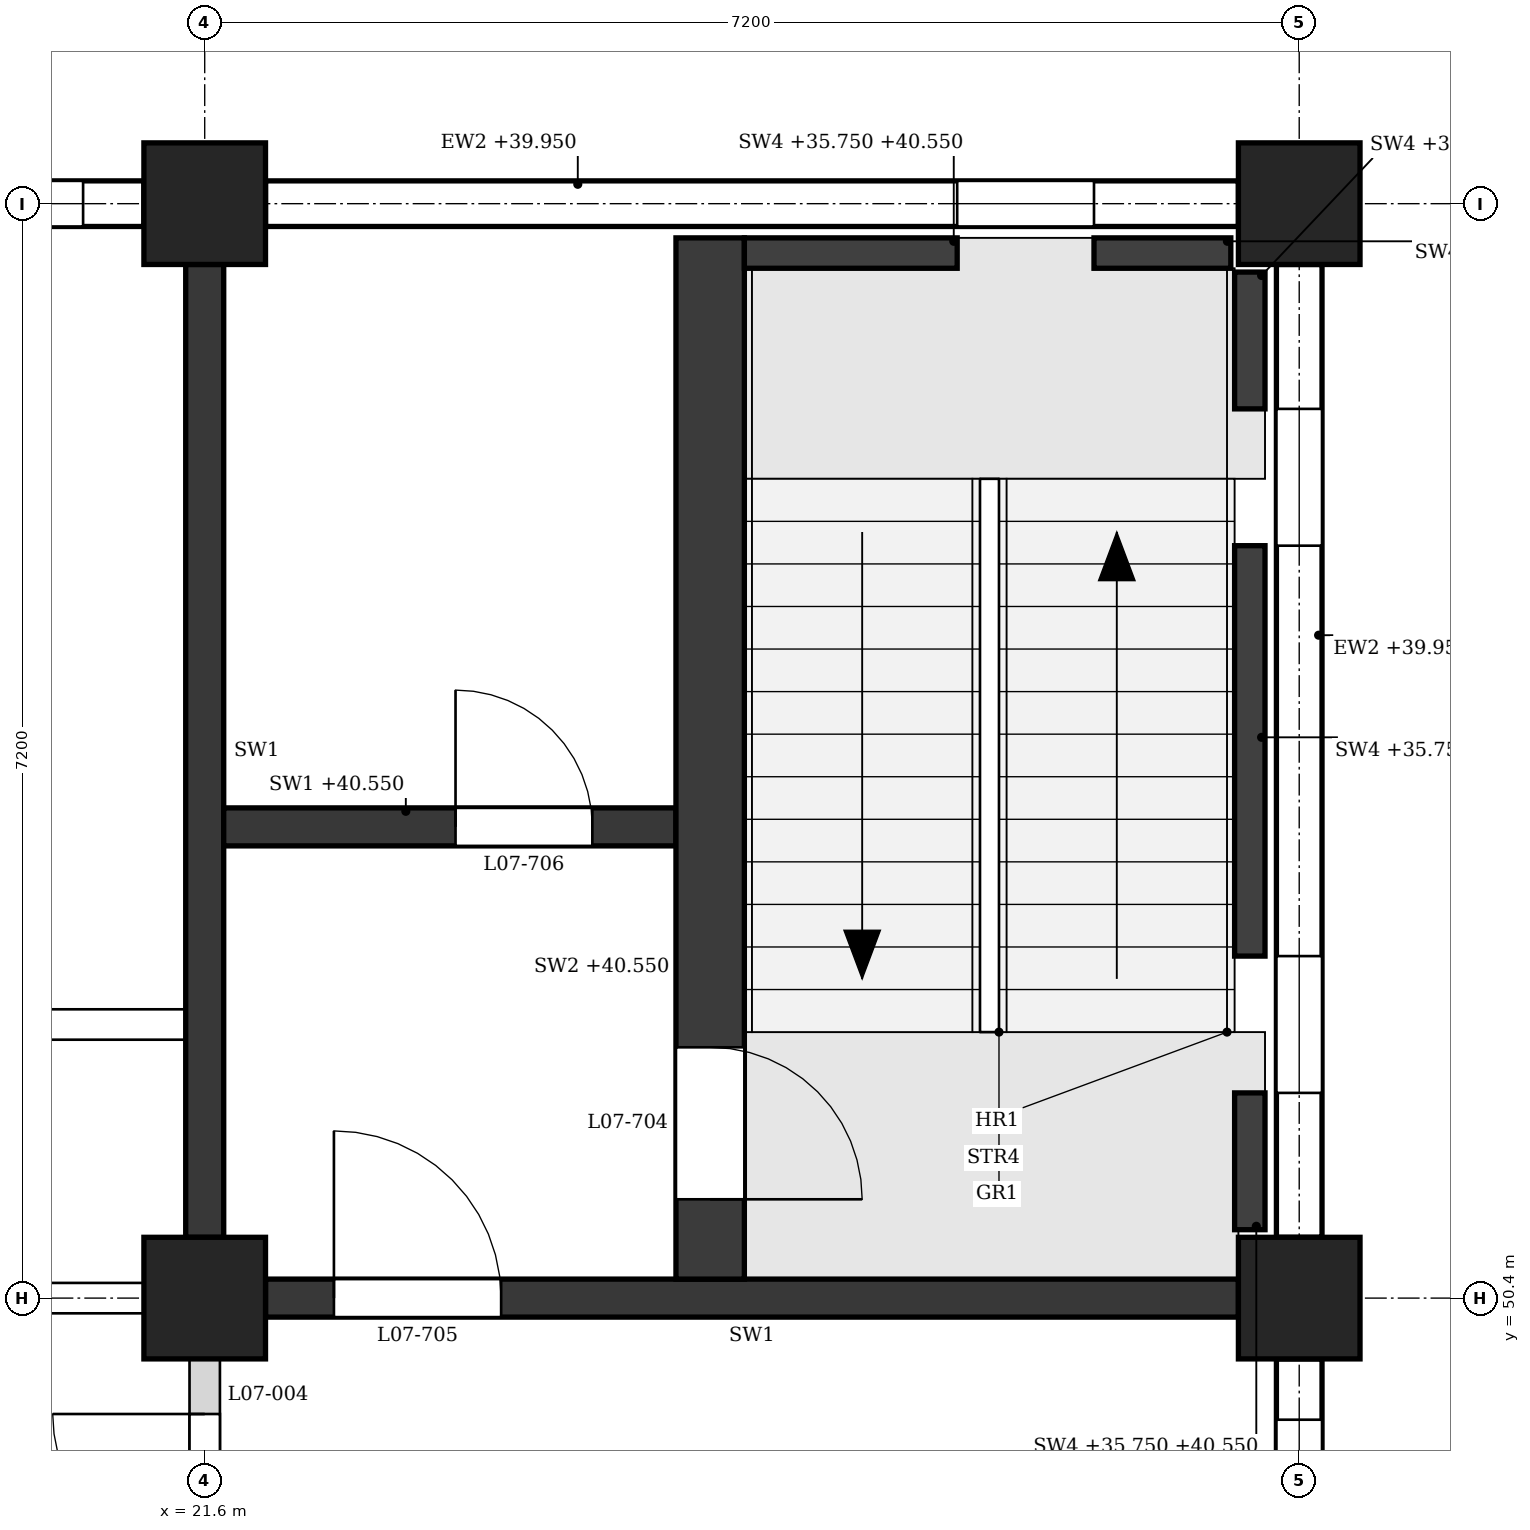
"""IFC4 building model, lengths in metres.
Left out: names, types, materials, properties, quantities, classifications, styles, units other than length and angle.
Written with IfcOpenShell. Run it as: python <this file> out.ifc"""

import sys

from ifc_helpers import new_model, si_unit, direction, frame, frame_2d, origin, origin_2d, place, context, subcontext, project, spatial, polyline, rectangle, outline, extrude, element, fill, save


model = new_model("IFC4")
c1 = context("Model", 3, precision=1e-05, world=origin(), true_north=direction((0.0, 1.0)))
c2 = subcontext(c1, "Body", "Model", "MODEL_VIEW")
j1 = project(units=[si_unit("LENGTHUNIT", "METRE"), si_unit("PLANEANGLEUNIT", "RADIAN")], contexts=[c1])
p1 = place(None, origin())
s1 = spatial("IfcSite", under=j1, at=p1, CompositionType="ELEMENT")
p2 = place(p1, origin())
s2 = spatial("IfcBuilding", under=s1, at=p2, CompositionType="ELEMENT")
p3 = place(p2, frame((0.0, 0.0, 36.0)))
s3 = spatial("IfcBuildingStorey", under=s2, at=p3, CompositionType="ELEMENT", Elevation=36.0)
for number, where, z_axis, x_axis in (
    (1, (21.6, 50.4, 0.0), (0.0, 0.0, 1.0), (1.0, 0.0, 0.0)),
    (2, (21.6, 57.6, 0.0), (0.0, 0.0, 1.0), (1.0, 0.0, 0.0)),
    (3, (28.8, 50.4, 0.0), (0.0, 0.0, 1.0), (1.0, 0.0, 0.0)),
    (4, (28.8, 57.6, 0.0), (0.0, 0.0, 1.0), (1.0, 0.0, 0.0)),
):
    element("IfcColumn", number, at=place(p3, frame(where, z_axis=z_axis, x_axis=x_axis)), inside=s3, PredefinedType="COLUMN", context=c2, shape_type="SweptSolid", body=[
        extrude(rectangle(XDim=0.8, YDim=0.8, at=origin_2d()), origin(), (0.0, 0.0, 1.0), 4.8),
    ])
p4 = place(p3, frame((28.4, 57.6, 0.0), z_axis=(0.0, 0.0, 1.0), x_axis=(-1.0, 0.0, 0.0)))
e5 = element("IfcWall", 5, at=p4, inside=s3, PredefinedType="STANDARD", context=c2, shape_type="SweptSolid", body=[
    extrude(rectangle(XDim=6.4, YDim=0.3, at=frame_2d((3.2, 0.0))), origin(), (0.0, 0.0, 1.0), 3.95),
])
p5 = place(p4, frame((0.95, 0.0, 0.9)))
e6 = element("IfcOpeningElement", 6, at=p5, cuts=e5, PredefinedType="OPENING", context=c2, shape_type="SweptSolid", body=[
    extrude(outline(polyline([(0.0, 0.0), (0.9, 0.0), (0.9, 2.55), (0.45, 3.0), (0.0, 2.55), (0.0, 0.0)])), frame((0.0, 0.16, 0.0), z_axis=(0.0, -1.0, 0.0), x_axis=(1.0, 0.0, 0.0)), (0.0, 0.0, 1.0), 0.32),
])
p6 = place(p3, frame((21.2, 57.6, 0.0), z_axis=(0.0, 0.0, 1.0), x_axis=(-1.0, 0.0, 0.0)))
e7 = element("IfcWall", 7, at=p6, inside=s3, PredefinedType="STANDARD", context=c2, shape_type="SweptSolid", body=[
    extrude(rectangle(XDim=6.4, YDim=0.3, at=frame_2d((3.2, 0.0))), origin(), (0.0, 0.0, 1.0), 3.95),
])
p7 = place(p6, frame((0.4, 0.0, 0.9)))
e8 = element("IfcOpeningElement", 8, at=p7, cuts=e7, PredefinedType="OPENING", context=c2, shape_type="SweptSolid", body=[
    extrude(outline(polyline([(0.0, 0.0), (0.85, 0.0), (0.85, 2.55), (0.425, 3.0), (0.0, 2.55), (0.0, 0.0)])), frame((0.0, 0.16, 0.0), z_axis=(0.0, -1.0, 0.0), x_axis=(1.0, 0.0, 0.0)), (0.0, 0.0, 1.0), 0.32),
])
p8 = place(p6, frame((1.55, 0.0, 0.9)))
e9 = element("IfcOpeningElement", 9, at=p8, cuts=e7, PredefinedType="OPENING", context=c2, shape_type="SweptSolid", body=[
    extrude(outline(polyline([(0.0, 0.0), (0.85, 0.0), (0.85, 2.55), (0.425, 3.0), (0.0, 2.55), (0.0, 0.0)])), frame((0.0, 0.16, 0.0), z_axis=(0.0, -1.0, 0.0), x_axis=(1.0, 0.0, 0.0)), (0.0, 0.0, 1.0), 0.32),
])
p9 = place(p6, frame((4.0, 0.0, 0.9)))
e10 = element("IfcOpeningElement", 10, at=p9, cuts=e7, PredefinedType="OPENING", context=c2, shape_type="SweptSolid", body=[
    extrude(outline(polyline([(0.0, 0.0), (0.85, 0.0), (0.85, 2.55), (0.425, 3.0), (0.0, 2.55), (0.0, 0.0)])), frame((0.0, 0.16, 0.0), z_axis=(0.0, -1.0, 0.0), x_axis=(1.0, 0.0, 0.0)), (0.0, 0.0, 1.0), 0.32),
])
p10 = place(p6, frame((5.15, 0.0, 0.9)))
e11 = element("IfcOpeningElement", 11, at=p10, cuts=e7, PredefinedType="OPENING", context=c2, shape_type="SweptSolid", body=[
    extrude(outline(polyline([(0.0, 0.0), (0.85, 0.0), (0.85, 2.55), (0.425, 3.0), (0.0, 2.55), (0.0, 0.0)])), frame((0.0, 0.16, 0.0), z_axis=(0.0, -1.0, 0.0), x_axis=(1.0, 0.0, 0.0)), (0.0, 0.0, 1.0), 0.32),
])
p11 = place(p3, frame((28.8, 43.6, 0.0), z_axis=(0.0, 0.0, 1.0), x_axis=(0.0, 1.0, 0.0)))
e12 = element("IfcWall", 12, at=p11, inside=s3, PredefinedType="STANDARD", context=c2, shape_type="SweptSolid", body=[
    extrude(rectangle(XDim=6.4, YDim=0.3, at=frame_2d((3.2, 0.0))), origin(), (0.0, 0.0, 1.0), 3.95),
])
p12 = place(p11, frame((4.0, 0.0, 0.9)))
e13 = element("IfcOpeningElement", 13, at=p12, cuts=e12, PredefinedType="OPENING", context=c2, shape_type="SweptSolid", body=[
    extrude(outline(polyline([(0.0, 0.0), (0.85, 0.0), (0.85, 2.55), (0.425, 3.0), (0.0, 2.55), (0.0, 0.0)])), frame((0.0, 0.16, 0.0), z_axis=(0.0, -1.0, 0.0), x_axis=(1.0, 0.0, 0.0)), (0.0, 0.0, 1.0), 0.32),
])
p13 = place(p11, frame((5.15, 0.0, 0.9)))
e14 = element("IfcOpeningElement", 14, at=p13, cuts=e12, PredefinedType="OPENING", context=c2, shape_type="SweptSolid", body=[
    extrude(outline(polyline([(0.0, 0.0), (0.85, 0.0), (0.85, 2.55), (0.425, 3.0), (0.0, 2.55), (0.0, 0.0)])), frame((0.0, 0.16, 0.0), z_axis=(0.0, -1.0, 0.0), x_axis=(1.0, 0.0, 0.0)), (0.0, 0.0, 1.0), 0.32),
])
p14 = place(p3, frame((28.8, 50.8, 0.0), z_axis=(0.0, 0.0, 1.0), x_axis=(0.0, 1.0, 0.0)))
e15 = element("IfcWall", 15, at=p14, inside=s3, PredefinedType="STANDARD", context=c2, shape_type="SweptSolid", body=[
    extrude(rectangle(XDim=6.4, YDim=0.3, at=frame_2d((3.2, 0.0))), origin(), (0.0, 0.0, 1.0), 3.95),
])
p15 = place(p14, frame((0.95, 0.0, 0.9)))
e16 = element("IfcOpeningElement", 16, at=p15, cuts=e15, PredefinedType="OPENING", context=c2, shape_type="SweptSolid", body=[
    extrude(outline(polyline([(0.0, 0.0), (0.9, 0.0), (0.9, 2.55), (0.45, 3.0), (0.0, 2.55), (0.0, 0.0)])), frame((0.0, 0.16, 0.0), z_axis=(0.0, -1.0, 0.0), x_axis=(1.0, 0.0, 0.0)), (0.0, 0.0, 1.0), 0.32),
])
p16 = place(p14, frame((4.55, 0.0, 0.9)))
e17 = element("IfcOpeningElement", 17, at=p16, cuts=e15, PredefinedType="OPENING", context=c2, shape_type="SweptSolid", body=[
    extrude(outline(polyline([(0.0, 0.0), (0.9, 0.0), (0.9, 2.55), (0.45, 3.0), (0.0, 2.55), (0.0, 0.0)])), frame((0.0, 0.16, 0.0), z_axis=(0.0, -1.0, 0.0), x_axis=(1.0, 0.0, 0.0)), (0.0, 0.0, 1.0), 0.32),
])
p17 = place(p3, frame((22.0, 50.4, 0.0), z_axis=(0.0, 0.0, 1.0), x_axis=(1.0, 0.0, 0.0)))
e18 = element("IfcWall", 18, at=p17, inside=s3, PredefinedType="SHEAR", context=c2, shape_type="SweptSolid", body=[
    extrude(rectangle(XDim=6.4, YDim=0.25, at=frame_2d((3.2, 0.0))), origin(), (0.0, 0.0, 1.0), 3.85),
])
p18 = place(p17, frame((0.45, 0.0, 0.0)))
e19 = element("IfcOpeningElement", 19, at=p18, cuts=e18, PredefinedType="OPENING", context=c2, shape_type="SweptSolid", body=[
    extrude(rectangle(XDim=1.1, YDim=2.1, at=frame_2d((0.55, 1.05))), frame((0.0, 0.135, 0.0), z_axis=(0.0, -1.0, 0.0), x_axis=(1.0, 0.0, 0.0)), (0.0, 0.0, 1.0), 0.27),
])
p19 = place(p3, frame((21.6, 50.8, 0.0), z_axis=(0.0, 0.0, 1.0), x_axis=(0.0, 1.0, 0.0)))
e20 = element("IfcWall", 20, at=p19, inside=s3, PredefinedType="SHEAR", context=c2, shape_type="SweptSolid", body=[
    extrude(rectangle(XDim=6.4, YDim=0.25, at=frame_2d((3.2, 0.0))), origin(), (0.0, 0.0, 1.0), 3.85),
])
p20 = place(p3, frame((28.475, 50.85, -0.25), z_axis=(0.0, 0.0, 1.0), x_axis=(0.0, 1.0, 0.0)))
e21 = element("IfcWall", 21, at=p20, inside=s3, PredefinedType="SHEAR", context=c2, shape_type="SweptSolid", body=[
    extrude(rectangle(XDim=0.9, YDim=0.2, at=frame_2d((0.45, 0.0))), origin(), (0.0, 0.0, 1.0), 4.8),
])
p21 = place(p3, frame((28.475, 52.65, -0.25), z_axis=(0.0, 0.0, 1.0), x_axis=(0.0, 1.0, 0.0)))
e22 = element("IfcWall", 22, at=p21, inside=s3, PredefinedType="SHEAR", context=c2, shape_type="SweptSolid", body=[
    extrude(rectangle(XDim=2.7, YDim=0.2, at=frame_2d((1.35, 0.0))), origin(), (0.0, 0.0, 1.0), 4.8),
])
p22 = place(p3, frame((28.475, 56.25, -0.25), z_axis=(0.0, 0.0, 1.0), x_axis=(0.0, 1.0, 0.0)))
e23 = element("IfcWall", 23, at=p22, inside=s3, PredefinedType="SHEAR", context=c2, shape_type="SweptSolid", body=[
    extrude(rectangle(XDim=0.9, YDim=0.2, at=frame_2d((0.45, 0.0))), origin(), (0.0, 0.0, 1.0), 4.8),
])
p23 = place(p3, frame((25.15, 57.275, -0.25), z_axis=(0.0, 0.0, 1.0), x_axis=(1.0, 0.0, 0.0)))
e24 = element("IfcWall", 24, at=p23, inside=s3, PredefinedType="SHEAR", context=c2, shape_type="SweptSolid", body=[
    extrude(rectangle(XDim=1.4, YDim=0.2, at=frame_2d((0.7, 0.0))), origin(), (0.0, 0.0, 1.0), 4.8),
])
p24 = place(p3, frame((27.45, 57.275, -0.25), z_axis=(0.0, 0.0, 1.0), x_axis=(1.0, 0.0, 0.0)))
e25 = element("IfcWall", 25, at=p24, inside=s3, PredefinedType="SHEAR", context=c2, shape_type="SweptSolid", body=[
    extrude(rectangle(XDim=0.9, YDim=0.2, at=frame_2d((0.45, 0.0))), origin(), (0.0, 0.0, 1.0), 4.8),
])
p25 = place(p3, frame((24.925, 50.525, 0.0), z_axis=(0.0, 0.0, 1.0), x_axis=(0.0, 1.0, 0.0)))
e26 = element("IfcWall", 26, at=p25, inside=s3, PredefinedType="SHEAR", context=c2, shape_type="SweptSolid", body=[
    extrude(rectangle(XDim=6.85, YDim=0.45, at=frame_2d((3.425, 0.0))), origin(), (0.0, 0.0, 1.0), 4.55),
])
p26 = place(p25, frame((0.525, 0.0, 0.0)))
e27 = element("IfcOpeningElement", 27, at=p26, cuts=e26, PredefinedType="OPENING", context=c2, shape_type="SweptSolid", body=[
    extrude(rectangle(XDim=1.0, YDim=2.1, at=frame_2d((0.5, 1.05))), frame((0.0, 0.235, 0.0), z_axis=(0.0, -1.0, 0.0), x_axis=(1.0, 0.0, 0.0)), (0.0, 0.0, 1.0), 0.47),
])
p27 = place(p3, frame((21.725, 53.5, 0.0), z_axis=(0.0, 0.0, 1.0), x_axis=(1.0, 0.0, 0.0)))
e28 = element("IfcWall", 28, at=p27, inside=s3, PredefinedType="SHEAR", context=c2, shape_type="SweptSolid", body=[
    extrude(rectangle(XDim=2.975, YDim=0.25, at=frame_2d((1.487, 0.0))), origin(), (0.0, 0.0, 1.0), 4.55),
])
p28 = place(p27, frame((1.525, 0.0, 0.0)))
e29 = element("IfcOpeningElement", 29, at=p28, cuts=e28, PredefinedType="OPENING", context=c2, shape_type="SweptSolid", body=[
    extrude(rectangle(XDim=0.9, YDim=2.1, at=frame_2d((0.45, 1.05))), frame((0.0, 0.135, 0.0), z_axis=(0.0, -1.0, 0.0), x_axis=(1.0, 0.0, 0.0)), (0.0, 0.0, 1.0), 0.27),
])
p29 = place(p3, frame((14.8, 50.4, 0.0), z_axis=(0.0, 0.0, 1.0), x_axis=(1.0, 0.0, 0.0)))
e30 = element("IfcWall", 30, at=p29, inside=s3, PredefinedType="PARTITIONING", context=c2, shape_type="SweptSolid", body=[
    extrude(rectangle(XDim=6.4, YDim=0.2, at=frame_2d((3.2, 0.0))), origin(), (0.0, 0.0, 1.0), 3.85),
])
p30 = place(p29, frame((4.3, 0.0, 0.0)))
e31 = element("IfcOpeningElement", 31, at=p30, cuts=e30, PredefinedType="OPENING", context=c2, shape_type="SweptSolid", body=[
    extrude(rectangle(XDim=1.0, YDim=2.1, at=frame_2d((0.5, 1.05))), frame((0.0, 0.11, 0.0), z_axis=(0.0, -1.0, 0.0), x_axis=(1.0, 0.0, 0.0)), (0.0, 0.0, 1.0), 0.22),
])
p31 = place(p3, frame((7.325, 52.2, 0.0), z_axis=(0.0, 0.0, 1.0), x_axis=(1.0, 0.0, 0.0)))
e32 = element("IfcWall", 32, at=p31, inside=s3, PredefinedType="PARTITIONING", context=c2, shape_type="SweptSolid", body=[
    extrude(outline(polyline([(0.0, 0.0), (14.15, 0.0), (14.15, 3.85), (14.05, 3.85), (14.05, 4.55), (7.3, 4.55), (7.3, 3.85), (6.85, 3.85), (6.85, 4.55), (0.1, 4.55), (0.1, 3.85), (0.0, 3.85), (0.0, 0.0)])), frame((0.0, 0.1, 0.0), z_axis=(0.0, -1.0, 0.0), x_axis=(1.0, 0.0, 0.0)), (0.0, 0.0, 1.0), 0.2),
])
p32 = place(p31, frame((1.238, 0.0, 0.0)))
e33 = element("IfcOpeningElement", 33, at=p32, cuts=e32, PredefinedType="OPENING", context=c2, shape_type="SweptSolid", body=[
    extrude(rectangle(XDim=1.0, YDim=2.1, at=frame_2d((0.5, 1.05))), frame((0.0, 0.11, 0.0), z_axis=(0.0, -1.0, 0.0), x_axis=(1.0, 0.0, 0.0)), (0.0, 0.0, 1.0), 0.22),
])
p33 = place(p31, frame((4.775, 0.0, 0.0)))
e34 = element("IfcOpeningElement", 34, at=p33, cuts=e32, PredefinedType="OPENING", context=c2, shape_type="SweptSolid", body=[
    extrude(rectangle(XDim=1.0, YDim=2.1, at=frame_2d((0.5, 1.05))), frame((0.0, 0.11, 0.0), z_axis=(0.0, -1.0, 0.0), x_axis=(1.0, 0.0, 0.0)), (0.0, 0.0, 1.0), 0.22),
])
p34 = place(p31, frame((8.375, 0.0, 0.0)))
e35 = element("IfcOpeningElement", 35, at=p34, cuts=e32, PredefinedType="OPENING", context=c2, shape_type="SweptSolid", body=[
    extrude(rectangle(XDim=1.0, YDim=2.1, at=frame_2d((0.5, 1.05))), frame((0.0, 0.11, 0.0), z_axis=(0.0, -1.0, 0.0), x_axis=(1.0, 0.0, 0.0)), (0.0, 0.0, 1.0), 0.22),
])
p35 = place(p31, frame((11.913, 0.0, 0.0)))
e36 = element("IfcOpeningElement", 36, at=p35, cuts=e32, PredefinedType="OPENING", context=c2, shape_type="SweptSolid", body=[
    extrude(rectangle(XDim=1.0, YDim=2.1, at=frame_2d((0.5, 1.05))), frame((0.0, 0.11, 0.0), z_axis=(0.0, -1.0, 0.0), x_axis=(1.0, 0.0, 0.0)), (0.0, 0.0, 1.0), 0.22),
])
p36 = place(p3, frame((21.6, 47.275, 0.0), z_axis=(0.0, 0.0, 1.0), x_axis=(0.0, 1.0, 0.0)))
e37 = element("IfcWall", 37, at=p36, inside=s3, PredefinedType="PARTITIONING", context=c2, shape_type="SweptSolid", body=[
    extrude(rectangle(XDim=2.725, YDim=0.2, at=frame_2d((1.363, 0.0))), origin(), (0.0, 0.0, 1.0), 3.85),
])
p37 = place(p36, frame((0.363, 0.0, 0.0)))
e38 = element("IfcOpeningElement", 38, at=p37, cuts=e37, PredefinedType="OPENING", context=c2, shape_type="SweptSolid", body=[
    extrude(rectangle(XDim=2.0, YDim=2.4, at=frame_2d((1.0, 1.2))), frame((0.0, 0.11, 0.0), z_axis=(0.0, -1.0, 0.0), x_axis=(1.0, 0.0, 0.0)), (0.0, 0.0, 1.0), 0.22),
])
p38 = place(p13, origin())
e39 = element("IfcWindow", 39, at=p38, inside=s3, PartitioningType="SINGLE_PANEL", PredefinedType="WINDOW", context=c2, shape_type="SweptSolid", body=[
    extrude(outline(polyline([(0.0, 0.0), (0.85, 0.0), (0.85, 2.55), (0.425, 3.0), (0.0, 2.55), (0.0, 0.0)])), frame((0.0, 0.03, 0.0), z_axis=(0.0, -1.0, 0.0), x_axis=(1.0, 0.0, 0.0)), (0.0, 0.0, 1.0), 0.06),
])
fill(e14, e39)
p39 = place(p15, origin())
e40 = element("IfcWindow", 40, at=p39, inside=s3, PartitioningType="SINGLE_PANEL", PredefinedType="WINDOW", context=c2, shape_type="SweptSolid", body=[
    extrude(outline(polyline([(0.0, 0.0), (0.9, 0.0), (0.9, 2.55), (0.45, 3.0), (0.0, 2.55), (0.0, 0.0)])), frame((0.0, 0.03, 0.0), z_axis=(0.0, -1.0, 0.0), x_axis=(1.0, 0.0, 0.0)), (0.0, 0.0, 1.0), 0.06),
])
fill(e16, e40)
p40 = place(p16, origin())
e41 = element("IfcWindow", 41, at=p40, inside=s3, PartitioningType="SINGLE_PANEL", PredefinedType="WINDOW", context=c2, shape_type="SweptSolid", body=[
    extrude(outline(polyline([(0.0, 0.0), (0.9, 0.0), (0.9, 2.55), (0.45, 3.0), (0.0, 2.55), (0.0, 0.0)])), frame((0.0, 0.03, 0.0), z_axis=(0.0, -1.0, 0.0), x_axis=(1.0, 0.0, 0.0)), (0.0, 0.0, 1.0), 0.06),
])
fill(e17, e41)
p41 = place(p5, origin())
e42 = element("IfcWindow", 42, at=p41, inside=s3, PartitioningType="SINGLE_PANEL", PredefinedType="WINDOW", context=c2, shape_type="SweptSolid", body=[
    extrude(outline(polyline([(0.0, 0.0), (0.9, 0.0), (0.9, 2.55), (0.45, 3.0), (0.0, 2.55), (0.0, 0.0)])), frame((0.0, 0.03, 0.0), z_axis=(0.0, -1.0, 0.0), x_axis=(1.0, 0.0, 0.0)), (0.0, 0.0, 1.0), 0.06),
])
fill(e6, e42)
p42 = place(p7, origin())
e43 = element("IfcWindow", 43, at=p42, inside=s3, PartitioningType="SINGLE_PANEL", PredefinedType="WINDOW", context=c2, shape_type="SweptSolid", body=[
    extrude(outline(polyline([(0.0, 0.0), (0.85, 0.0), (0.85, 2.55), (0.425, 3.0), (0.0, 2.55), (0.0, 0.0)])), frame((0.0, 0.03, 0.0), z_axis=(0.0, -1.0, 0.0), x_axis=(1.0, 0.0, 0.0)), (0.0, 0.0, 1.0), 0.06),
])
fill(e8, e43)
p43 = place(p26, frame((1.0, 0.0, 0.0), z_axis=(0.0, 0.0, 1.0), x_axis=(-1.0, 0.0, 0.0)))
e44 = element("IfcDoor", 44, at=p43, inside=s3, OperationType="SINGLE_SWING_RIGHT", PredefinedType="DOOR", context=c2, shape_type="SweptSolid", body=[
    extrude(rectangle(XDim=1.0, YDim=2.1, at=frame_2d((0.5, 1.05))), frame((0.0, 0.025, 0.0), z_axis=(0.0, -1.0, 0.0), x_axis=(1.0, 0.0, 0.0)), (0.0, 0.0, 1.0), 0.05),
])
fill(e27, e44)
p44 = place(p18, origin())
e45 = element("IfcDoor", 45, at=p44, inside=s3, OperationType="SINGLE_SWING_LEFT", PredefinedType="DOOR", context=c2, shape_type="SweptSolid", body=[
    extrude(rectangle(XDim=1.1, YDim=2.1, at=frame_2d((0.55, 1.05))), frame((0.0, 0.025, 0.0), z_axis=(0.0, -1.0, 0.0), x_axis=(1.0, 0.0, 0.0)), (0.0, 0.0, 1.0), 0.05),
])
fill(e19, e45)
p45 = place(p28, origin())
e46 = element("IfcDoor", 46, at=p45, inside=s3, OperationType="SINGLE_SWING_LEFT", PredefinedType="DOOR", context=c2, shape_type="SweptSolid", body=[
    extrude(rectangle(XDim=0.9, YDim=2.1, at=frame_2d((0.45, 1.05))), frame((0.0, 0.025, 0.0), z_axis=(0.0, -1.0, 0.0), x_axis=(1.0, 0.0, 0.0)), (0.0, 0.0, 1.0), 0.05),
])
fill(e29, e46)
p46 = place(p37, origin())
e47 = element("IfcDoor", 47, at=p46, inside=s3, OperationType="DOUBLE_DOOR_SINGLE_SWING", PredefinedType="DOOR", context=c2, shape_type="SweptSolid", body=[
    extrude(rectangle(XDim=2.0, YDim=2.4, at=frame_2d((1.0, 1.2))), frame((0.0, 0.025, 0.0), z_axis=(0.0, -1.0, 0.0), x_axis=(1.0, 0.0, 0.0)), (0.0, 0.0, 1.0), 0.05),
])
fill(e38, e47)
save(model, sys.argv[1])
